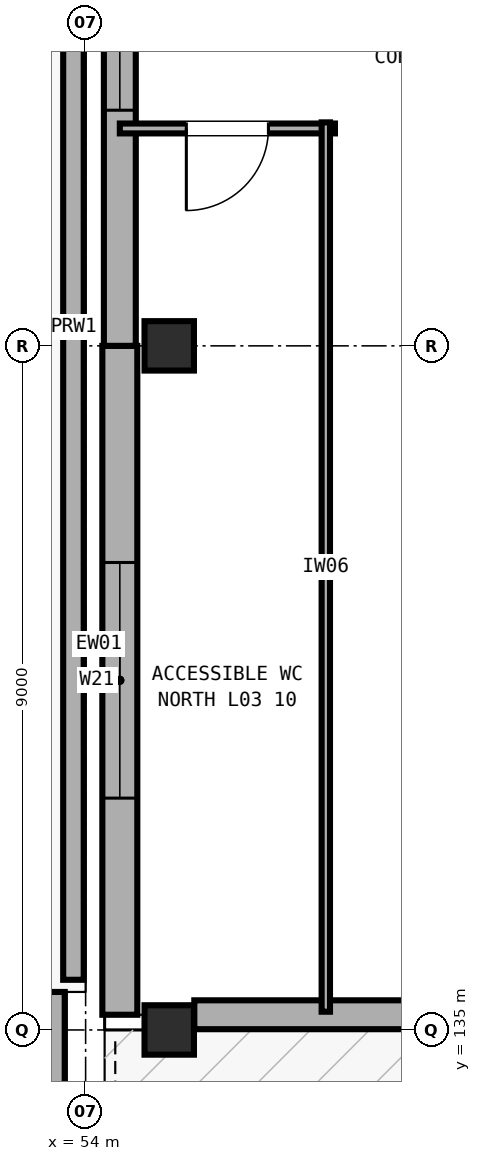
"""IFC4 building model, lengths in metres.
Left out: names, types, materials, properties, quantities, classifications, styles, units other than length and angle.
Written with IfcOpenShell. Run it as: python <this file> out.ifc"""

import sys

from ifc_helpers import new_model, si_unit, direction, frame, frame_2d, origin, origin_2d, place, context, subcontext, project, spatial, rectangle, extrude, element, fill, save


model = new_model("IFC4")
c1 = context("Model", 3, precision=1e-05, world=origin(), true_north=direction((0.0, 1.0)))
c2 = subcontext(c1, "Body", "Model", "MODEL_VIEW")
j1 = project(units=[si_unit("LENGTHUNIT", "METRE"), si_unit("PLANEANGLEUNIT", "RADIAN")], contexts=[c1])
p1 = place(None, origin())
s1 = spatial("IfcSite", under=j1, at=p1, CompositionType="ELEMENT")
p2 = place(p1, origin())
s2 = spatial("IfcBuilding", under=s1, at=p2, CompositionType="ELEMENT")
p3 = place(p2, frame((0.0, 0.0, 14.4)))
s3 = spatial("IfcBuildingStorey", under=s2, at=p3, CompositionType="ELEMENT", Elevation=14.4)
for number, where, z_axis, x_axis in (
    (1, (55.1, 135.0, 0.0), (0.0, 0.0, 1.0), (1.0, 0.0, 0.0)),
    (2, (55.1, 144.0, 0.0), (0.0, 0.0, 1.0), (1.0, 0.0, 0.0)),
):
    element("IfcColumn", number, at=place(p3, frame(where, z_axis=z_axis, x_axis=x_axis)), inside=s3, PredefinedType="COLUMN", context=c2, shape_type="SweptSolid", body=[
        extrude(rectangle(XDim=0.65, YDim=0.65, at=origin_2d()), origin(), (0.0, 0.0, 1.0), 4.8),
    ])
p4 = place(p3, frame((54.45, 135.2, 0.0), z_axis=(0.0, 0.0, 1.0), x_axis=(0.0, 1.0, 0.0)))
e3 = element("IfcWall", 3, at=p4, inside=s3, PredefinedType="SOLIDWALL", context=c2, shape_type="SweptSolid", body=[
    extrude(rectangle(XDim=8.8, YDim=0.46, at=frame_2d((4.4, 0.0))), origin(), (0.0, 0.0, 1.0), 3.58),
])
p5 = place(p4, frame((2.85, 0.0, 0.9)))
e4 = element("IfcOpeningElement", 4, at=p5, cuts=e3, PredefinedType="OPENING", context=c2, shape_type="SweptSolid", body=[
    extrude(rectangle(XDim=3.1, YDim=2.1, at=frame_2d((1.55, 1.05))), frame((0.0, 0.24, 0.0), z_axis=(0.0, -1.0, 0.0), x_axis=(1.0, 0.0, 0.0)), (0.0, 0.0, 1.0), 0.48),
])
p6 = place(p3, frame((54.45, 144.0, 0.0), z_axis=(0.0, 0.0, 1.0), x_axis=(0.0, 1.0, 0.0)))
e5 = element("IfcWall", 5, at=p6, inside=s3, PredefinedType="SOLIDWALL", context=c2, shape_type="SweptSolid", body=[
    extrude(rectangle(XDim=8.8, YDim=0.42, at=frame_2d((4.4, 0.0))), origin(), (0.0, 0.0, 1.0), 3.58),
])
p7 = place(p6, frame((3.1, 0.0, 0.9)))
e6 = element("IfcOpeningElement", 6, at=p7, cuts=e5, PredefinedType="OPENING", context=c2, shape_type="SweptSolid", body=[
    extrude(rectangle(XDim=2.8, YDim=2.2, at=frame_2d((1.4, 1.1))), frame((0.0, 0.22, 0.0), z_axis=(0.0, -1.0, 0.0), x_axis=(1.0, 0.0, 0.0)), (0.0, 0.0, 1.0), 0.44),
])
p8 = place(p3, frame((62.67, 135.2, 0.0), z_axis=(0.0, 0.0, 1.0), x_axis=(-1.0, 0.0, 0.0)))
e7 = element("IfcWall", 7, at=p8, inside=s3, PredefinedType="SOLIDWALL", context=c2, shape_type="SweptSolid", body=[
    extrude(rectangle(XDim=7.24, YDim=0.38, at=frame_2d((3.62, 0.0))), origin(), (0.0, 0.0, 1.0), 3.58),
])
p9 = place(p3, frame((53.59, 135.5, 0.0), z_axis=(0.0, 0.0, 1.0), x_axis=(0.0, -1.0, 0.0)))
e8 = element("IfcWall", 8, at=p9, inside=s3, PredefinedType="PARAPET", context=c2, shape_type="SweptSolid", body=[
    extrude(rectangle(XDim=9.34, YDim=0.27, at=frame_2d((4.67, 0.0))), origin(), (0.0, 0.0, 1.0), 0.65),
])
p10 = place(p3, frame((53.84, 152.84, 0.0), z_axis=(0.0, 0.0, 1.0), x_axis=(0.0, -1.0, 0.0)))
e9 = element("IfcWall", 9, at=p10, inside=s3, PredefinedType="PARAPET", context=c2, shape_type="SweptSolid", body=[
    extrude(rectangle(XDim=17.18, YDim=0.27, at=frame_2d((8.59, 0.0))), origin(), (0.0, 0.0, 1.0), 0.65),
])
p11 = place(p3, frame((57.28, 146.86, 0.0), z_axis=(0.0, 0.0, 1.0), x_axis=(-1.0, 0.0, 0.0)))
e10 = element("IfcWall", 10, at=p11, inside=s3, PredefinedType="PARTITIONING", context=c2, shape_type="SweptSolid", body=[
    extrude(rectangle(XDim=2.83, YDim=0.13, at=frame_2d((1.415, 0.0))), origin(), (0.0, 0.0, 1.0), 3.56),
])
p12 = place(p11, frame((0.875, 0.0, 0.0)))
e11 = element("IfcOpeningElement", 11, at=p12, cuts=e10, PredefinedType="OPENING", context=c2, shape_type="SweptSolid", body=[
    extrude(rectangle(XDim=1.08, YDim=2.18, at=frame_2d((0.54, 1.09))), frame((0.0, 0.075, 0.0), z_axis=(0.0, -1.0, 0.0), x_axis=(1.0, 0.0, 0.0)), (0.0, 0.0, 1.0), 0.15),
])
p13 = place(p3, frame((57.16, 146.94, 0.0), z_axis=(0.0, 0.0, 1.0), x_axis=(0.0, -1.0, 0.0)))
e12 = element("IfcWall", 12, at=p13, inside=s3, PredefinedType="PARTITIONING", context=c2, shape_type="SweptSolid", body=[
    extrude(rectangle(XDim=11.7, YDim=0.11, at=frame_2d((5.85, 0.0))), origin(), (0.0, 0.0, 1.0), 3.56),
])
p14 = place(p5, origin())
e13 = element("IfcWindow", 13, at=p14, inside=s3, PartitioningType="DOUBLE_PANEL_VERTICAL", PredefinedType="WINDOW", context=c2, shape_type="SweptSolid", body=[
    extrude(rectangle(XDim=3.1, YDim=2.1, at=frame_2d((1.55, 1.05))), frame((0.0, 0.03, 0.0), z_axis=(0.0, -1.0, 0.0), x_axis=(1.0, 0.0, 0.0)), (0.0, 0.0, 1.0), 0.06),
])
fill(e4, e13)
p15 = place(p7, origin())
e14 = element("IfcWindow", 14, at=p15, inside=s3, PartitioningType="DOUBLE_PANEL_VERTICAL", PredefinedType="WINDOW", context=c2, shape_type="SweptSolid", body=[
    extrude(rectangle(XDim=2.8, YDim=2.2, at=frame_2d((1.4, 1.1))), frame((0.0, 0.03, 0.0), z_axis=(0.0, -1.0, 0.0), x_axis=(1.0, 0.0, 0.0)), (0.0, 0.0, 1.0), 0.06),
])
fill(e6, e14)
p16 = place(p12, origin())
e15 = element("IfcDoor", 15, at=p16, inside=s3, OperationType="SINGLE_SWING_RIGHT", PredefinedType="DOOR", context=c2, shape_type="SweptSolid", body=[
    extrude(rectangle(XDim=1.08, YDim=2.18, at=frame_2d((0.54, 1.09))), frame((0.0, 0.025, 0.0), z_axis=(0.0, -1.0, 0.0), x_axis=(1.0, 0.0, 0.0)), (0.0, 0.0, 1.0), 0.05),
])
fill(e11, e15)
save(model, sys.argv[1])
